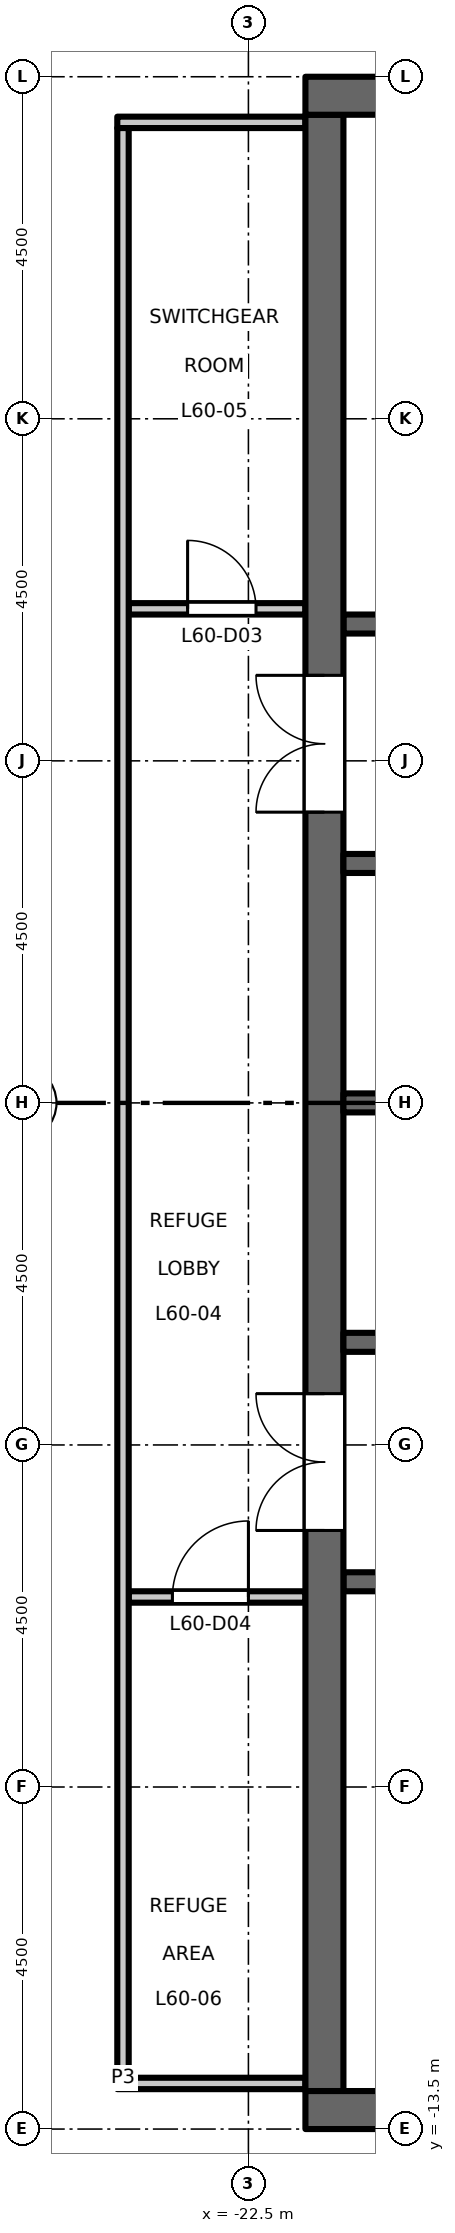
"""IFC4 building model, lengths in metres.
Left out: names, types, materials, properties, quantities, classifications, styles, units other than length and angle.
Written with IfcOpenShell. Run it as: python <this file> out.ifc"""

import sys

from ifc_helpers import new_model, si_unit, direction, frame, frame_2d, origin, place, context, subcontext, project, spatial, rectangle, extrude, element, fill, save


model = new_model("IFC4")
c1 = context("Model", 3, precision=1e-05, world=origin(), true_north=direction((0.0, 1.0)))
c2 = subcontext(c1, "Body", "Model", "MODEL_VIEW")
j1 = project(units=[si_unit("LENGTHUNIT", "METRE"), si_unit("PLANEANGLEUNIT", "RADIAN")], contexts=[c1])
p1 = place(None, origin())
s1 = spatial("IfcSite", under=j1, at=p1, CompositionType="ELEMENT")
p2 = place(p1, origin())
s2 = spatial("IfcBuilding", under=s1, at=p2, CompositionType="ELEMENT")
p3 = place(p2, frame((0.0, 0.0, 278.2)))
s3 = spatial("IfcBuildingStorey", under=s2, at=p3, CompositionType="ELEMENT", Elevation=278.2)
p4 = place(p3, frame((-17.0, 6.3, 0.0), z_axis=(0.0, 0.0, 1.0), x_axis=(-1.0, 0.0, 0.0)))
e1 = element("IfcWall", 1, at=p4, inside=s3, PredefinedType="SHEAR", context=c2, shape_type="SweptSolid", body=[
    extrude(rectangle(XDim=4.25, YDim=0.25, at=frame_2d((2.125, 0.0))), origin(), (0.0, 0.0, 1.0), 5.8),
])
p5 = place(p3, frame((-12.15, -6.3, 0.0), z_axis=(0.0, 0.0, 1.0), x_axis=(-1.0, 0.0, 0.0)))
e2 = element("IfcWall", 2, at=p5, inside=s3, PredefinedType="SHEAR", context=c2, shape_type="SweptSolid", body=[
    extrude(rectangle(XDim=9.1, YDim=0.25, at=frame_2d((4.55, 0.0))), origin(), (0.0, 0.0, 1.0), 5.8),
])
p6 = place(p5, frame((1.8, 0.0, 0.0)))
e3 = element("IfcOpeningElement", 3, at=p6, cuts=e2, PredefinedType="OPENING", context=c2, shape_type="SweptSolid", body=[
    extrude(rectangle(XDim=1.0, YDim=2.1, at=frame_2d((0.5, 1.05))), frame((0.0, 0.135, 0.0), z_axis=(0.0, -1.0, 0.0), x_axis=(1.0, 0.0, 0.0)), (0.0, 0.0, 1.0), 0.27),
])
p7 = place(p3, frame((-21.5, -13.0, 0.0), z_axis=(0.0, 0.0, 1.0), x_axis=(0.0, 1.0, 0.0)))
e4 = element("IfcWall", 4, at=p7, inside=s3, PredefinedType="SHEAR", context=c2, shape_type="SweptSolid", body=[
    extrude(rectangle(XDim=26.0, YDim=0.5, at=frame_2d((13.0, 0.0))), origin(), (0.0, 0.0, 1.0), 5.8),
])
p8 = place(p7, frame((16.825, 0.0, 0.0)))
e5 = element("IfcOpeningElement", 5, at=p8, cuts=e4, PredefinedType="OPENING", context=c2, shape_type="SweptSolid", body=[
    extrude(rectangle(XDim=1.8, YDim=2.1, at=frame_2d((0.9, 1.05))), frame((0.0, 0.26, 0.0), z_axis=(0.0, -1.0, 0.0), x_axis=(1.0, 0.0, 0.0)), (0.0, 0.0, 1.0), 0.52),
])
p9 = place(p7, frame((7.375, 0.0, 0.0)))
e6 = element("IfcOpeningElement", 6, at=p9, cuts=e4, PredefinedType="OPENING", context=c2, shape_type="SweptSolid", body=[
    extrude(rectangle(XDim=1.8, YDim=2.1, at=frame_2d((0.9, 1.05))), frame((0.0, 0.26, 0.0), z_axis=(0.0, -1.0, 0.0), x_axis=(1.0, 0.0, 0.0)), (0.0, 0.0, 1.0), 0.52),
])
for number, where, z_axis, x_axis in (
    (7, (-17.05, 0.0, 0.0), (0.0, 0.0, 1.0), (-1.0, 0.0, 0.0)),
    (8, (-17.05, 3.15, 0.0), (0.0, 0.0, 1.0), (-1.0, 0.0, 0.0)),
    (9, (-17.05, -3.15, 0.0), (0.0, 0.0, 1.0), (-1.0, 0.0, 0.0)),
):
    element("IfcWall", number, at=place(p3, frame(where, z_axis=z_axis, x_axis=x_axis)), inside=s3, PredefinedType="SHEAR", context=c2, shape_type="SweptSolid", body=[
        extrude(rectangle(XDim=4.2, YDim=0.25, at=frame_2d((2.1, 0.0))), origin(), (0.0, 0.0, 1.0), 5.8),
    ])
for number, where, z_axis, x_axis in (
    (10, (-8.25, 13.25, 0.0), (0.0, 0.0, 1.0), (-1.0, 0.0, 0.0)),
    (11, (-8.25, -13.25, 0.0), (0.0, 0.0, 1.0), (-1.0, 0.0, 0.0)),
):
    element("IfcWall", number, at=place(p3, frame(where, z_axis=z_axis, x_axis=x_axis)), inside=s3, PredefinedType="SHEAR", context=c2, shape_type="SweptSolid", body=[
        extrude(rectangle(XDim=13.5, YDim=0.5, at=frame_2d((6.75, 0.0))), origin(), (0.0, 0.0, 1.0), 5.8),
    ])
p10 = place(p3, frame((-24.225, -12.9, 0.0), z_axis=(0.0, 0.0, 1.0), x_axis=(1.0, 0.0, 0.0)))
e12 = element("IfcWall", 12, at=p10, inside=s3, PredefinedType="PARTITIONING", context=c2, shape_type="SweptSolid", body=[
    extrude(rectangle(XDim=2.475, YDim=0.15, at=frame_2d((1.238, 0.0))), origin(), (0.0, 0.0, 1.0), 5.8),
])
p11 = place(p3, frame((-24.075, -6.5, 0.0), z_axis=(0.0, 0.0, 1.0), x_axis=(1.0, 0.0, 0.0)))
e13 = element("IfcWall", 13, at=p11, inside=s3, PredefinedType="PARTITIONING", context=c2, shape_type="SweptSolid", body=[
    extrude(rectangle(XDim=2.325, YDim=0.15, at=frame_2d((1.163, 0.0))), origin(), (0.0, 0.0, 1.0), 5.8),
])
p12 = place(p11, frame((0.575, 0.0, 0.0)))
e14 = element("IfcOpeningElement", 14, at=p12, cuts=e13, PredefinedType="OPENING", context=c2, shape_type="SweptSolid", body=[
    extrude(rectangle(XDim=1.0, YDim=2.1, at=frame_2d((0.5, 1.05))), frame((0.0, 0.085, 0.0), z_axis=(0.0, -1.0, 0.0), x_axis=(1.0, 0.0, 0.0)), (0.0, 0.0, 1.0), 0.17),
])
p13 = place(p3, frame((-24.075, 6.5, 0.0), z_axis=(0.0, 0.0, 1.0), x_axis=(1.0, 0.0, 0.0)))
e15 = element("IfcWall", 15, at=p13, inside=s3, PredefinedType="PARTITIONING", context=c2, shape_type="SweptSolid", body=[
    extrude(rectangle(XDim=2.325, YDim=0.15, at=frame_2d((1.163, 0.0))), origin(), (0.0, 0.0, 1.0), 5.8),
])
p14 = place(p13, frame((0.775, 0.0, 0.0)))
e16 = element("IfcOpeningElement", 16, at=p14, cuts=e15, PredefinedType="OPENING", context=c2, shape_type="SweptSolid", body=[
    extrude(rectangle(XDim=0.9, YDim=2.1, at=frame_2d((0.45, 1.05))), frame((0.0, 0.085, 0.0), z_axis=(0.0, -1.0, 0.0), x_axis=(1.0, 0.0, 0.0)), (0.0, 0.0, 1.0), 0.17),
])
p15 = place(p3, frame((-24.225, 12.9, 0.0), z_axis=(0.0, 0.0, 1.0), x_axis=(1.0, 0.0, 0.0)))
e17 = element("IfcWall", 17, at=p15, inside=s3, PredefinedType="PARTITIONING", context=c2, shape_type="SweptSolid", body=[
    extrude(rectangle(XDim=2.475, YDim=0.15, at=frame_2d((1.238, 0.0))), origin(), (0.0, 0.0, 1.0), 5.8),
])
p16 = place(p3, frame((-24.15, -12.825, 0.0), z_axis=(0.0, 0.0, 1.0), x_axis=(0.0, 1.0, 0.0)))
e18 = element("IfcWall", 18, at=p16, inside=s3, PredefinedType="PARTITIONING", context=c2, shape_type="SweptSolid", body=[
    extrude(rectangle(XDim=25.65, YDim=0.15, at=frame_2d((12.825, 0.0))), origin(), (0.0, 0.0, 1.0), 5.8),
])
p17 = place(p8, origin())
e19 = element("IfcDoor", 19, at=p17, inside=s3, OperationType="DOUBLE_DOOR_DOUBLE_SWING", PredefinedType="DOOR", context=c2, shape_type="SweptSolid", body=[
    extrude(rectangle(XDim=1.8, YDim=2.1, at=frame_2d((0.9, 1.05))), frame((0.0, 0.025, 0.0), z_axis=(0.0, -1.0, 0.0), x_axis=(1.0, 0.0, 0.0)), (0.0, 0.0, 1.0), 0.05),
])
fill(e5, e19)
p18 = place(p9, origin())
e20 = element("IfcDoor", 20, at=p18, inside=s3, OperationType="DOUBLE_DOOR_DOUBLE_SWING", PredefinedType="DOOR", context=c2, shape_type="SweptSolid", body=[
    extrude(rectangle(XDim=1.8, YDim=2.1, at=frame_2d((0.9, 1.05))), frame((0.0, 0.025, 0.0), z_axis=(0.0, -1.0, 0.0), x_axis=(1.0, 0.0, 0.0)), (0.0, 0.0, 1.0), 0.05),
])
fill(e6, e20)
p19 = place(p14, origin())
e21 = element("IfcDoor", 21, at=p19, inside=s3, OperationType="SINGLE_SWING_LEFT", PredefinedType="DOOR", context=c2, shape_type="SweptSolid", body=[
    extrude(rectangle(XDim=0.9, YDim=2.1, at=frame_2d((0.45, 1.05))), frame((0.0, 0.025, 0.0), z_axis=(0.0, -1.0, 0.0), x_axis=(1.0, 0.0, 0.0)), (0.0, 0.0, 1.0), 0.05),
])
fill(e16, e21)
p20 = place(p12, origin())
e22 = element("IfcDoor", 22, at=p20, inside=s3, OperationType="SINGLE_SWING_RIGHT", PredefinedType="DOOR", context=c2, shape_type="SweptSolid", body=[
    extrude(rectangle(XDim=1.0, YDim=2.1, at=frame_2d((0.5, 1.05))), frame((0.0, 0.025, 0.0), z_axis=(0.0, -1.0, 0.0), x_axis=(1.0, 0.0, 0.0)), (0.0, 0.0, 1.0), 0.05),
])
fill(e14, e22)
save(model, sys.argv[1])
